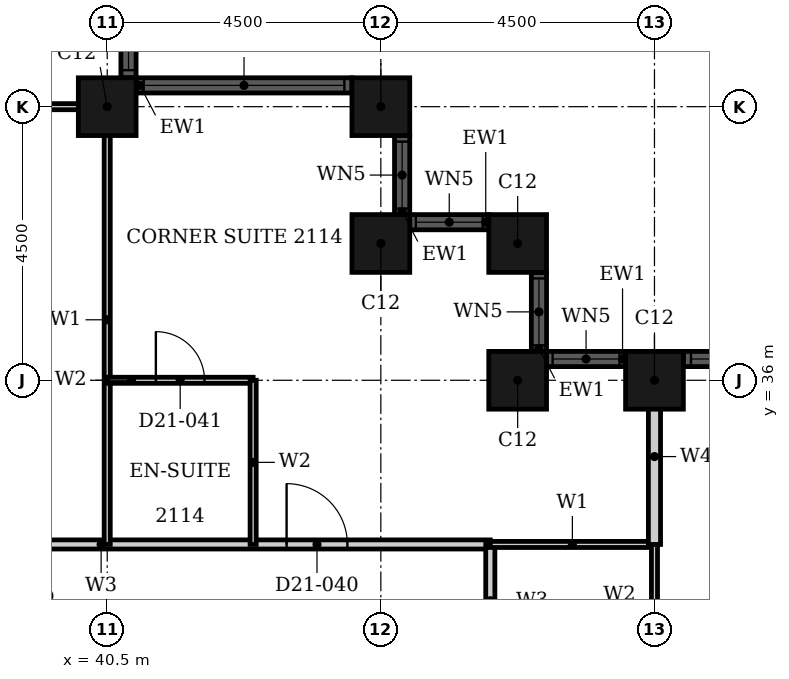
"""IFC4 building model, lengths in metres.
Left out: names, types, materials, properties, quantities, classifications, styles, units other than length and angle.
Written with IfcOpenShell. Run it as: python <this file> out.ifc"""

import sys

from ifc_helpers import new_model, si_unit, direction, frame, frame_2d, origin, origin_2d, place, context, subcontext, project, spatial, rectangle, hollow_rectangle, extrude, element, fill, save


model = new_model("IFC4")
c1 = context("Model", 3, precision=1e-05, world=origin(), true_north=direction((0.0, 1.0)))
c2 = subcontext(c1, "Body", "Model", "MODEL_VIEW")
j1 = project(units=[si_unit("LENGTHUNIT", "METRE"), si_unit("PLANEANGLEUNIT", "RADIAN")], contexts=[c1])
p1 = place(None, origin())
s1 = spatial("IfcSite", under=j1, at=p1, CompositionType="ELEMENT")
p2 = place(p1, origin())
s2 = spatial("IfcBuilding", under=s1, at=p2, CompositionType="ELEMENT")
p3 = place(p2, frame((0.0, 0.0, 88.8)))
s3 = spatial("IfcBuildingStorey", under=s2, at=p3, CompositionType="ELEMENT", Elevation=88.8)
for number, where, z_axis, x_axis in (
    (1, (49.5, 36.0, 0.0), (0.0, 0.0, 1.0), (1.0, 0.0, 0.0)),
    (2, (47.25, 36.0, 0.0), (0.0, 0.0, 1.0), (1.0, 0.0, 0.0)),
    (3, (47.25, 38.25, 0.0), (0.0, 0.0, 1.0), (1.0, 0.0, 0.0)),
    (4, (45.0, 38.25, 0.0), (0.0, 0.0, 1.0), (1.0, 0.0, 0.0)),
    (5, (45.0, 40.5, 0.0), (0.0, 0.0, 1.0), (1.0, 0.0, 0.0)),
    (6, (40.5, 40.5, 0.0), (0.0, 0.0, 1.0), (1.0, 0.0, 0.0)),
):
    element("IfcColumn", number, at=place(p3, frame(where, z_axis=z_axis, x_axis=x_axis)), inside=s3, PredefinedType="COLUMN", context=c2, shape_type="SweptSolid", body=[
        extrude(hollow_rectangle(XDim=0.95, YDim=0.95, WallThickness=0.03, at=origin_2d()), origin(), (0.0, 0.0, 1.0), 3.6),
    ])
p4 = place(p3, frame((58.025, 36.35, 0.0), z_axis=(0.0, 0.0, 1.0), x_axis=(-1.0, 0.0, 0.0)))
e7 = element("IfcWall", 7, at=p4, inside=s3, PredefinedType="SOLIDWALL", context=c2, shape_type="SweptSolid", body=[
    extrude(rectangle(XDim=8.05, YDim=0.25, at=frame_2d((4.025, 0.0))), origin(), (0.0, 0.0, 1.0), 3.6),
])
p5 = place(p4, frame((0.125, 0.0, 0.9)))
e8 = element("IfcOpeningElement", 8, at=p5, cuts=e7, PredefinedType="OPENING", context=c2, shape_type="SweptSolid", body=[
    extrude(rectangle(XDim=3.3, YDim=2.08, at=frame_2d((1.65, 1.04))), frame((0.0, 0.135, 0.0), z_axis=(0.0, -1.0, 0.0), x_axis=(1.0, 0.0, 0.0)), (0.0, 0.0, 1.0), 0.27),
])
p6 = place(p4, frame((4.625, 0.0, 0.9)))
e9 = element("IfcOpeningElement", 9, at=p6, cuts=e7, PredefinedType="OPENING", context=c2, shape_type="SweptSolid", body=[
    extrude(rectangle(XDim=3.3, YDim=2.08, at=frame_2d((1.65, 1.04))), frame((0.0, 0.135, 0.0), z_axis=(0.0, -1.0, 0.0), x_axis=(1.0, 0.0, 0.0)), (0.0, 0.0, 1.0), 0.27),
])
p7 = place(p3, frame((49.025, 36.35, 0.0), z_axis=(0.0, 0.0, 1.0), x_axis=(-1.0, 0.0, 0.0)))
e10 = element("IfcWall", 10, at=p7, inside=s3, PredefinedType="SOLIDWALL", context=c2, shape_type="SweptSolid", body=[
    extrude(rectangle(XDim=1.3, YDim=0.25, at=frame_2d((0.65, 0.0))), origin(), (0.0, 0.0, 1.0), 3.6),
])
p8 = place(p7, frame((0.1, 0.0, 0.9)))
e11 = element("IfcOpeningElement", 11, at=p8, cuts=e10, PredefinedType="OPENING", context=c2, shape_type="SweptSolid", body=[
    extrude(rectangle(XDim=1.1, YDim=2.08, at=frame_2d((0.55, 1.04))), frame((0.0, 0.135, 0.0), z_axis=(0.0, -1.0, 0.0), x_axis=(1.0, 0.0, 0.0)), (0.0, 0.0, 1.0), 0.27),
])
p9 = place(p3, frame((47.6, 36.475, 0.0), z_axis=(0.0, 0.0, 1.0), x_axis=(0.0, 1.0, 0.0)))
e12 = element("IfcWall", 12, at=p9, inside=s3, PredefinedType="SOLIDWALL", context=c2, shape_type="SweptSolid", body=[
    extrude(rectangle(XDim=1.3, YDim=0.25, at=frame_2d((0.65, 0.0))), origin(), (0.0, 0.0, 1.0), 3.6),
])
p10 = place(p9, frame((0.1, 0.0, 0.9)))
e13 = element("IfcOpeningElement", 13, at=p10, cuts=e12, PredefinedType="OPENING", context=c2, shape_type="SweptSolid", body=[
    extrude(rectangle(XDim=1.1, YDim=2.08, at=frame_2d((0.55, 1.04))), frame((0.0, 0.135, 0.0), z_axis=(0.0, -1.0, 0.0), x_axis=(1.0, 0.0, 0.0)), (0.0, 0.0, 1.0), 0.27),
])
p11 = place(p3, frame((46.775, 38.6, 0.0), z_axis=(0.0, 0.0, 1.0), x_axis=(-1.0, 0.0, 0.0)))
e14 = element("IfcWall", 14, at=p11, inside=s3, PredefinedType="SOLIDWALL", context=c2, shape_type="SweptSolid", body=[
    extrude(rectangle(XDim=1.3, YDim=0.25, at=frame_2d((0.65, 0.0))), origin(), (0.0, 0.0, 1.0), 3.6),
])
p12 = place(p11, frame((0.1, 0.0, 0.9)))
e15 = element("IfcOpeningElement", 15, at=p12, cuts=e14, PredefinedType="OPENING", context=c2, shape_type="SweptSolid", body=[
    extrude(rectangle(XDim=1.1, YDim=2.08, at=frame_2d((0.55, 1.04))), frame((0.0, 0.135, 0.0), z_axis=(0.0, -1.0, 0.0), x_axis=(1.0, 0.0, 0.0)), (0.0, 0.0, 1.0), 0.27),
])
p13 = place(p3, frame((45.35, 38.725, 0.0), z_axis=(0.0, 0.0, 1.0), x_axis=(0.0, 1.0, 0.0)))
e16 = element("IfcWall", 16, at=p13, inside=s3, PredefinedType="SOLIDWALL", context=c2, shape_type="SweptSolid", body=[
    extrude(rectangle(XDim=1.3, YDim=0.25, at=frame_2d((0.65, 0.0))), origin(), (0.0, 0.0, 1.0), 3.6),
])
p14 = place(p13, frame((0.1, 0.0, 0.9)))
e17 = element("IfcOpeningElement", 17, at=p14, cuts=e16, PredefinedType="OPENING", context=c2, shape_type="SweptSolid", body=[
    extrude(rectangle(XDim=1.1, YDim=2.08, at=frame_2d((0.55, 1.04))), frame((0.0, 0.135, 0.0), z_axis=(0.0, -1.0, 0.0), x_axis=(1.0, 0.0, 0.0)), (0.0, 0.0, 1.0), 0.27),
])
p15 = place(p3, frame((44.525, 40.85, 0.0), z_axis=(0.0, 0.0, 1.0), x_axis=(-1.0, 0.0, 0.0)))
e18 = element("IfcWall", 18, at=p15, inside=s3, PredefinedType="SOLIDWALL", context=c2, shape_type="SweptSolid", body=[
    extrude(rectangle(XDim=3.55, YDim=0.25, at=frame_2d((1.775, 0.0))), origin(), (0.0, 0.0, 1.0), 3.6),
])
p16 = place(p15, frame((0.125, 0.0, 0.9)))
e19 = element("IfcOpeningElement", 19, at=p16, cuts=e18, PredefinedType="OPENING", context=c2, shape_type="SweptSolid", body=[
    extrude(rectangle(XDim=3.3, YDim=2.08, at=frame_2d((1.65, 1.04))), frame((0.0, 0.135, 0.0), z_axis=(0.0, -1.0, 0.0), x_axis=(1.0, 0.0, 0.0)), (0.0, 0.0, 1.0), 0.27),
])
p17 = place(p3, frame((40.85, 40.975, 0.0), z_axis=(0.0, 0.0, 1.0), x_axis=(0.0, 1.0, 0.0)))
e20 = element("IfcWall", 20, at=p17, inside=s3, PredefinedType="SOLIDWALL", context=c2, shape_type="SweptSolid", body=[
    extrude(rectangle(XDim=8.05, YDim=0.25, at=frame_2d((4.025, 0.0))), origin(), (0.0, 0.0, 1.0), 3.6),
])
p18 = place(p17, frame((0.125, 0.0, 0.9)))
e21 = element("IfcOpeningElement", 21, at=p18, cuts=e20, PredefinedType="OPENING", context=c2, shape_type="SweptSolid", body=[
    extrude(rectangle(XDim=3.3, YDim=2.08, at=frame_2d((1.65, 1.04))), frame((0.0, 0.135, 0.0), z_axis=(0.0, -1.0, 0.0), x_axis=(1.0, 0.0, 0.0)), (0.0, 0.0, 1.0), 0.27),
])
p19 = place(p17, frame((4.625, 0.0, 0.9)))
e22 = element("IfcOpeningElement", 22, at=p19, cuts=e20, PredefinedType="OPENING", context=c2, shape_type="SweptSolid", body=[
    extrude(rectangle(XDim=3.3, YDim=2.08, at=frame_2d((1.65, 1.04))), frame((0.0, 0.135, 0.0), z_axis=(0.0, -1.0, 0.0), x_axis=(1.0, 0.0, 0.0)), (0.0, 0.0, 1.0), 0.27),
])
p20 = place(p3, frame((33.3, 33.3, 0.0), z_axis=(0.0, 0.0, 1.0), x_axis=(1.0, 0.0, 0.0)))
e23 = element("IfcWall", 23, at=p20, inside=s3, PredefinedType="PARTITIONING", context=c2, shape_type="SweptSolid", body=[
    extrude(rectangle(XDim=13.5, YDim=0.15, at=frame_2d((6.75, 0.0))), origin(), (0.0, 0.0, 1.0), 3.3),
])
p21 = place(p20, frame((10.15, 0.0, 0.0)))
e24 = element("IfcOpeningElement", 24, at=p21, cuts=e23, PredefinedType="OPENING", context=c2, shape_type="SweptSolid", body=[
    extrude(rectangle(XDim=1.0, YDim=2.1, at=frame_2d((0.5, 1.05))), frame((0.0, 0.085, 0.0), z_axis=(0.0, -1.0, 0.0), x_axis=(1.0, 0.0, 0.0)), (0.0, 0.0, 1.0), 0.17),
])
p22 = place(p20, frame((3.15, 0.0, 0.0)))
e25 = element("IfcOpeningElement", 25, at=p22, cuts=e23, PredefinedType="OPENING", context=c2, shape_type="SweptSolid", body=[
    extrude(rectangle(XDim=0.9, YDim=2.1, at=frame_2d((0.45, 1.05))), frame((0.0, 0.085, 0.0), z_axis=(0.0, -1.0, 0.0), x_axis=(1.0, 0.0, 0.0)), (0.0, 0.0, 1.0), 0.17),
])
p23 = place(p3, frame((46.8, 28.8, 0.0), z_axis=(0.0, 0.0, 1.0), x_axis=(0.0, 1.0, 0.0)))
e26 = element("IfcWall", 26, at=p23, inside=s3, PredefinedType="PARTITIONING", context=c2, shape_type="SweptSolid", body=[
    extrude(rectangle(XDim=4.5, YDim=0.15, at=frame_2d((2.25, 0.0))), origin(), (0.0, 0.0, 1.0), 3.3),
])
p24 = place(p23, frame((1.75, 0.0, 0.0)))
e27 = element("IfcOpeningElement", 27, at=p24, cuts=e26, PredefinedType="OPENING", context=c2, shape_type="SweptSolid", body=[
    extrude(rectangle(XDim=0.9, YDim=2.1, at=frame_2d((0.45, 1.05))), frame((0.0, 0.085, 0.0), z_axis=(0.0, -1.0, 0.0), x_axis=(1.0, 0.0, 0.0)), (0.0, 0.0, 1.0), 0.17),
])
p25 = place(p3, frame((46.8, 33.3, 0.0), z_axis=(0.0, 0.0, 1.0), x_axis=(1.0, 0.0, 0.0)))
e28 = element("IfcWall", 28, at=p25, inside=s3, PredefinedType="PARTITIONING", context=c2, shape_type="SweptSolid", body=[
    extrude(rectangle(XDim=2.7, YDim=0.1, at=frame_2d((1.35, 0.0))), origin(), (0.0, 0.0, 1.0), 3.3),
])
p26 = place(p3, frame((33.3, 40.5, 0.0), z_axis=(0.0, 0.0, 1.0), x_axis=(1.0, 0.0, 0.0)))
e29 = element("IfcWall", 29, at=p26, inside=s3, PredefinedType="PARTITIONING", context=c2, shape_type="SweptSolid", body=[
    extrude(rectangle(XDim=7.39, YDim=0.1, at=frame_2d((3.695, 0.0))), origin(), (0.0, 0.0, 1.0), 2.38),
])
p27 = place(p3, frame((40.5, 33.3, 0.0), z_axis=(0.0, 0.0, 1.0), x_axis=(0.0, 1.0, 0.0)))
e30 = element("IfcWall", 30, at=p27, inside=s3, PredefinedType="PARTITIONING", context=c2, shape_type="SweptSolid", body=[
    extrude(rectangle(XDim=7.39, YDim=0.1, at=frame_2d((3.695, 0.0))), origin(), (0.0, 0.0, 1.0), 3.3),
])
p28 = place(p3, frame((49.5, 28.8, 0.0), z_axis=(0.0, 0.0, 1.0), x_axis=(0.0, 1.0, 0.0)))
e31 = element("IfcWall", 31, at=p28, inside=s3, PredefinedType="PARTITIONING", context=c2, shape_type="SweptSolid", body=[
    extrude(rectangle(XDim=4.5, YDim=0.1, at=frame_2d((2.25, 0.0))), origin(), (0.0, 0.0, 1.0), 2.38),
])
p29 = place(p3, frame((49.5, 33.3, 0.0), z_axis=(0.0, 0.0, 1.0), x_axis=(0.0, 1.0, 0.0)))
e32 = element("IfcWall", 32, at=p29, inside=s3, PredefinedType="PARTITIONING", context=c2, shape_type="SweptSolid", body=[
    extrude(rectangle(XDim=2.89, YDim=0.2, at=frame_2d((1.445, 0.0))), origin(), (0.0, 0.0, 1.0), 2.38),
])
p30 = place(p3, frame((40.5, 36.0, 0.0), z_axis=(0.0, 0.0, 1.0), x_axis=(1.0, 0.0, 0.0)))
e33 = element("IfcWall", 33, at=p30, inside=s3, PredefinedType="PARTITIONING", context=c2, shape_type="SweptSolid", body=[
    extrude(rectangle(XDim=2.4, YDim=0.1, at=frame_2d((1.2, 0.0))), origin(), (0.0, 0.0, 1.0), 3.3),
])
p31 = place(p30, frame((0.8, 0.0, 0.0)))
e34 = element("IfcOpeningElement", 34, at=p31, cuts=e33, PredefinedType="OPENING", context=c2, shape_type="SweptSolid", body=[
    extrude(rectangle(XDim=0.8, YDim=2.1, at=frame_2d((0.4, 1.05))), frame((0.0, 0.06, 0.0), z_axis=(0.0, -1.0, 0.0), x_axis=(1.0, 0.0, 0.0)), (0.0, 0.0, 1.0), 0.12),
])
p32 = place(p3, frame((42.9, 33.3, 0.0), z_axis=(0.0, 0.0, 1.0), x_axis=(0.0, 1.0, 0.0)))
e35 = element("IfcWall", 35, at=p32, inside=s3, PredefinedType="PARTITIONING", context=c2, shape_type="SweptSolid", body=[
    extrude(rectangle(XDim=2.7, YDim=0.1, at=frame_2d((1.35, 0.0))), origin(), (0.0, 0.0, 1.0), 3.3),
])
p33 = place(p6, origin())
e36 = element("IfcWindow", 36, at=p33, inside=s3, PartitioningType="SINGLE_PANEL", PredefinedType="WINDOW", context=c2, shape_type="SweptSolid", body=[
    extrude(rectangle(XDim=3.3, YDim=2.08, at=frame_2d((1.65, 1.04))), frame((0.0, 0.03, 0.0), z_axis=(0.0, -1.0, 0.0), x_axis=(1.0, 0.0, 0.0)), (0.0, 0.0, 1.0), 0.06),
])
fill(e9, e36)
p34 = place(p8, origin())
e37 = element("IfcWindow", 37, at=p34, inside=s3, PartitioningType="SINGLE_PANEL", PredefinedType="WINDOW", context=c2, shape_type="SweptSolid", body=[
    extrude(rectangle(XDim=1.1, YDim=2.08, at=frame_2d((0.55, 1.04))), frame((0.0, 0.03, 0.0), z_axis=(0.0, -1.0, 0.0), x_axis=(1.0, 0.0, 0.0)), (0.0, 0.0, 1.0), 0.06),
])
fill(e11, e37)
p35 = place(p10, origin())
e38 = element("IfcWindow", 38, at=p35, inside=s3, PartitioningType="SINGLE_PANEL", PredefinedType="WINDOW", context=c2, shape_type="SweptSolid", body=[
    extrude(rectangle(XDim=1.1, YDim=2.08, at=frame_2d((0.55, 1.04))), frame((0.0, 0.03, 0.0), z_axis=(0.0, -1.0, 0.0), x_axis=(1.0, 0.0, 0.0)), (0.0, 0.0, 1.0), 0.06),
])
fill(e13, e38)
p36 = place(p12, origin())
e39 = element("IfcWindow", 39, at=p36, inside=s3, PartitioningType="SINGLE_PANEL", PredefinedType="WINDOW", context=c2, shape_type="SweptSolid", body=[
    extrude(rectangle(XDim=1.1, YDim=2.08, at=frame_2d((0.55, 1.04))), frame((0.0, 0.03, 0.0), z_axis=(0.0, -1.0, 0.0), x_axis=(1.0, 0.0, 0.0)), (0.0, 0.0, 1.0), 0.06),
])
fill(e15, e39)
p37 = place(p14, origin())
e40 = element("IfcWindow", 40, at=p37, inside=s3, PartitioningType="SINGLE_PANEL", PredefinedType="WINDOW", context=c2, shape_type="SweptSolid", body=[
    extrude(rectangle(XDim=1.1, YDim=2.08, at=frame_2d((0.55, 1.04))), frame((0.0, 0.03, 0.0), z_axis=(0.0, -1.0, 0.0), x_axis=(1.0, 0.0, 0.0)), (0.0, 0.0, 1.0), 0.06),
])
fill(e17, e40)
p38 = place(p16, origin())
e41 = element("IfcWindow", 41, at=p38, inside=s3, PartitioningType="SINGLE_PANEL", PredefinedType="WINDOW", context=c2, shape_type="SweptSolid", body=[
    extrude(rectangle(XDim=3.3, YDim=2.08, at=frame_2d((1.65, 1.04))), frame((0.0, 0.03, 0.0), z_axis=(0.0, -1.0, 0.0), x_axis=(1.0, 0.0, 0.0)), (0.0, 0.0, 1.0), 0.06),
])
fill(e19, e41)
p39 = place(p18, origin())
e42 = element("IfcWindow", 42, at=p39, inside=s3, PartitioningType="SINGLE_PANEL", PredefinedType="WINDOW", context=c2, shape_type="SweptSolid", body=[
    extrude(rectangle(XDim=3.3, YDim=2.08, at=frame_2d((1.65, 1.04))), frame((0.0, 0.03, 0.0), z_axis=(0.0, -1.0, 0.0), x_axis=(1.0, 0.0, 0.0)), (0.0, 0.0, 1.0), 0.06),
])
fill(e21, e42)
p40 = place(p21, origin())
e43 = element("IfcDoor", 43, at=p40, inside=s3, OperationType="SINGLE_SWING_RIGHT", PredefinedType="DOOR", context=c2, shape_type="SweptSolid", body=[
    extrude(rectangle(XDim=1.0, YDim=2.1, at=frame_2d((0.5, 1.05))), frame((0.0, 0.025, 0.0), z_axis=(0.0, -1.0, 0.0), x_axis=(1.0, 0.0, 0.0)), (0.0, 0.0, 1.0), 0.05),
])
fill(e24, e43)
p41 = place(p31, origin())
e44 = element("IfcDoor", 44, at=p41, inside=s3, OperationType="SINGLE_SWING_RIGHT", PredefinedType="DOOR", context=c2, shape_type="SweptSolid", body=[
    extrude(rectangle(XDim=0.8, YDim=2.1, at=frame_2d((0.4, 1.05))), frame((0.0, 0.025, 0.0), z_axis=(0.0, -1.0, 0.0), x_axis=(1.0, 0.0, 0.0)), (0.0, 0.0, 1.0), 0.05),
])
fill(e34, e44)
save(model, sys.argv[1])
